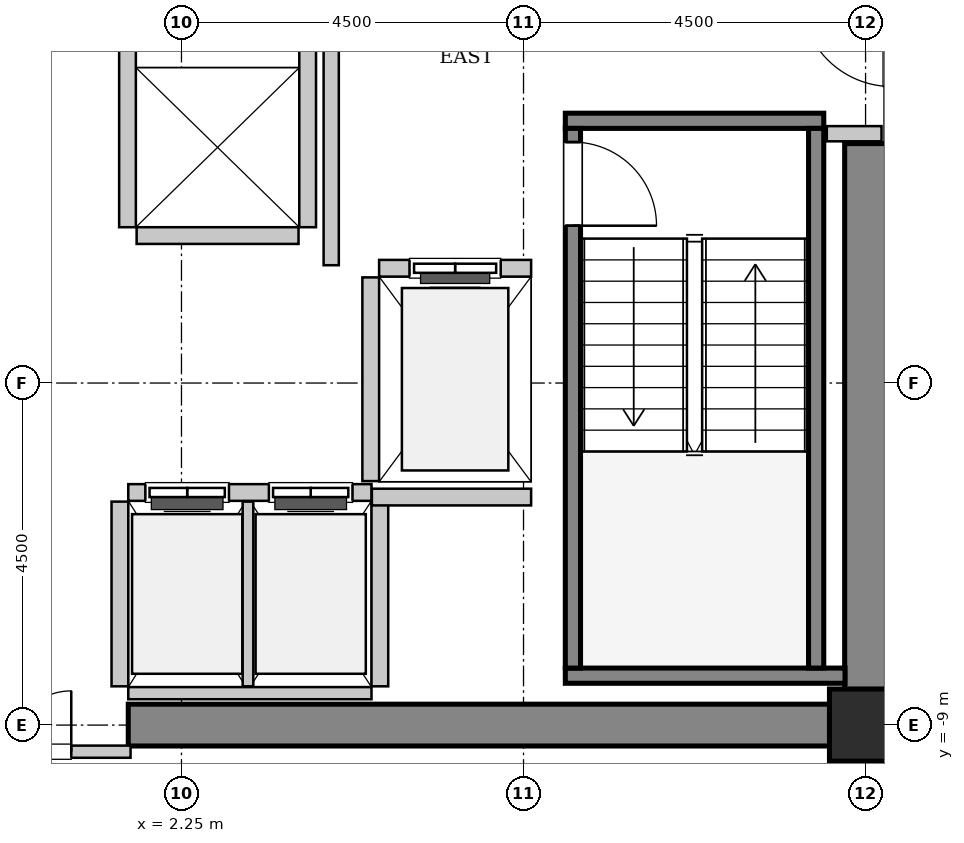
"""IFC4 building model, lengths in metres.
Left out: names, types, materials, properties, quantities, classifications, styles, units other than length and angle.
Written with IfcOpenShell. Run it as: python <this file> out.ifc"""

import sys

from ifc_helpers import new_model, si_unit, direction, frame, frame_2d, origin, origin_2d, place, context, subcontext, project, spatial, rectangle, hollow_rectangle, extrude, source, transform, mapped, element, fill, save


model = new_model("IFC4")
c1 = context("Model", 3, precision=1e-05, world=origin(), true_north=direction((0.0, 1.0)))
c2 = subcontext(c1, "Body", "Model", "MODEL_VIEW")
j1 = project(units=[si_unit("LENGTHUNIT", "METRE"), si_unit("PLANEANGLEUNIT", "RADIAN")], contexts=[c1])
p1 = place(None, origin())
s1 = spatial("IfcSite", under=j1, at=p1, CompositionType="ELEMENT")
p2 = place(p1, origin())
s2 = spatial("IfcBuilding", under=s1, at=p2, CompositionType="ELEMENT")
p3 = place(p2, frame((0.0, 0.0, 183.0)))
s3 = spatial("IfcBuildingStorey", under=s2, at=p3, CompositionType="ELEMENT", Elevation=183.0)
m1 = source(origin(), c2, "Body", "SweptSolid", [
    extrude(rectangle(XDim=9.975, YDim=0.55, at=frame_2d((4.987, 0.0))), origin(), (0.0, 0.0, 1.0), 3.8),
])
p4 = place(p3, frame((1.55, -9.0, 0.0), z_axis=(0.0, 0.0, 1.0), x_axis=(1.0, 0.0, 0.0)))
e1 = element("IfcWall", 1, at=p4, inside=s3, PredefinedType="SHEAR", context=c2, shape_type="MappedRepresentation", body=[
    mapped(m1, transform((0.0, 0.0, 0.0), x_axis=(1.0, 0.0, 0.0), y_axis=(0.0, 1.0, 0.0), z_axis=(0.0, 0.0, 1.0), scale=1.0)),
])
m2 = source(origin(), c2, "Body", "SweptSolid", [
    extrude(rectangle(XDim=7.375, YDim=0.55, at=frame_2d((3.688, 0.0))), origin(), (0.0, 0.0, 1.0), 3.8),
])
p5 = place(p3, frame((11.25, -8.725, 0.0), z_axis=(0.0, 0.0, 1.0), x_axis=(0.0, 1.0, 0.0)))
e2 = element("IfcWall", 2, at=p5, inside=s3, PredefinedType="SHEAR", context=c2, shape_type="MappedRepresentation", body=[
    mapped(m2, transform((0.0, 0.0, 0.0), x_axis=(1.0, 0.0, 0.0), y_axis=(0.0, 1.0, 0.0), z_axis=(0.0, 0.0, 1.0), scale=1.0)),
])
m3 = source(origin(), c2, "Body", "SweptSolid", [
    extrude(hollow_rectangle(XDim=0.95, YDim=0.95, WallThickness=0.045, InnerFilletRadius=0.045, OuterFilletRadius=0.09, at=origin_2d()), origin(), (0.0, 0.0, 1.0), 3.8),
])
p6 = place(p3, frame((11.25, -9.0, 0.0), z_axis=(0.0, 0.0, 1.0), x_axis=(1.0, 0.0, 0.0)))
e3 = element("IfcColumn", 3, at=p6, inside=s3, PredefinedType="COLUMN", context=c2, shape_type="MappedRepresentation", body=[
    mapped(m3, transform((0.0, 0.0, 0.0), x_axis=(1.0, 0.0, 0.0), y_axis=(0.0, 1.0, 0.0), z_axis=(0.0, 0.0, 1.0), scale=1.0)),
])
m4 = source(origin(), c2, "Body", "SweptSolid", [
    extrude(rectangle(XDim=3.4, YDim=0.2, at=frame_2d((1.7, 0.0))), origin(), (0.0, 0.0, 1.0), 3.8),
])
p7 = place(p3, frame((7.3, -1.05, 0.0), z_axis=(0.0, 0.0, 1.0), x_axis=(1.0, 0.0, 0.0)))
e4 = element("IfcWall", 4, at=p7, inside=s3, PredefinedType="SOLIDWALL", context=c2, shape_type="MappedRepresentation", body=[
    mapped(m4, transform((0.0, 0.0, 0.0), x_axis=(1.0, 0.0, 0.0), y_axis=(0.0, 1.0, 0.0), z_axis=(0.0, 0.0, 1.0), scale=1.0)),
])
m5 = source(origin(), c2, "Body", "SweptSolid", [
    extrude(rectangle(XDim=3.68, YDim=0.2, at=frame_2d((1.84, 0.0))), origin(), (0.0, 0.0, 1.0), 3.8),
])
p8 = place(p3, frame((7.3, -8.35, 0.0), z_axis=(0.0, 0.0, 1.0), x_axis=(1.0, 0.0, 0.0)))
e5 = element("IfcWall", 5, at=p8, inside=s3, PredefinedType="SOLIDWALL", context=c2, shape_type="MappedRepresentation", body=[
    mapped(m5, transform((0.0, 0.0, 0.0), x_axis=(1.0, 0.0, 0.0), y_axis=(0.0, 1.0, 0.0), z_axis=(0.0, 0.0, 1.0), scale=1.0)),
])
m6 = source(origin(), c2, "Body", "SweptSolid", [
    extrude(rectangle(XDim=7.1, YDim=0.2, at=frame_2d((3.55, 0.0))), origin(), (0.0, 0.0, 1.0), 3.8),
])
p9 = place(p3, frame((7.4, -1.15, 0.0), z_axis=(0.0, 0.0, 1.0), x_axis=(0.0, -1.0, 0.0)))
e6 = element("IfcWall", 6, at=p9, inside=s3, PredefinedType="SOLIDWALL", context=c2, shape_type="MappedRepresentation", body=[
    mapped(m6, transform((0.0, 0.0, 0.0), x_axis=(1.0, 0.0, 0.0), y_axis=(0.0, 1.0, 0.0), z_axis=(0.0, 0.0, 1.0), scale=1.0)),
])
p10 = place(p9, frame((0.18, 0.0, 0.0)))
e7 = element("IfcOpeningElement", 7, at=p10, cuts=e6, PredefinedType="OPENING", context=c2, shape_type="SweptSolid", body=[
    extrude(rectangle(XDim=1.1, YDim=2.15, at=frame_2d((0.55, 1.075))), frame((0.0, 0.11, 0.0), z_axis=(0.0, -1.0, 0.0), x_axis=(1.0, 0.0, 0.0)), (0.0, 0.0, 1.0), 0.22),
])
p11 = place(p3, frame((10.6, -1.15, 0.0), z_axis=(0.0, 0.0, 1.0), x_axis=(0.0, -1.0, 0.0)))
e8 = element("IfcWall", 8, at=p11, inside=s3, PredefinedType="SOLIDWALL", context=c2, shape_type="MappedRepresentation", body=[
    mapped(m6, transform((0.0, 0.0, 0.0), x_axis=(1.0, 0.0, 0.0), y_axis=(0.0, 1.0, 0.0), z_axis=(0.0, 0.0, 1.0), scale=1.0)),
])
m7 = source(origin(), c2, "Body", "SweptSolid", [
    extrude(rectangle(XDim=2.0, YDim=0.22, at=frame_2d((1.0, 0.0))), origin(), (0.0, 0.0, 1.0), 3.535),
])
p12 = place(p3, frame((6.85, -2.99, 0.0), z_axis=(0.0, 0.0, 1.0), x_axis=(-1.0, 0.0, 0.0)))
e9 = element("IfcWall", 9, at=p12, inside=s3, PredefinedType="SOLIDWALL", context=c2, shape_type="MappedRepresentation", body=[
    mapped(m7, transform((0.0, 0.0, 0.0), x_axis=(1.0, 0.0, 0.0), y_axis=(0.0, 1.0, 0.0), z_axis=(0.0, 0.0, 1.0), scale=1.0)),
])
p13 = place(p12, frame((0.4, 0.0, 0.0)))
e10 = element("IfcOpeningElement", 10, at=p13, cuts=e9, PredefinedType="OPENING", context=c2, shape_type="SweptSolid", body=[
    extrude(rectangle(XDim=1.2, YDim=2.2, at=frame_2d((0.6, 1.1))), frame((0.0, 0.12, 0.0), z_axis=(0.0, -1.0, 0.0), x_axis=(1.0, 0.0, 0.0)), (0.0, 0.0, 1.0), 0.24),
])
m8 = source(origin(), c2, "Body", "SweptSolid", [
    extrude(rectangle(XDim=2.68, YDim=0.22, at=frame_2d((1.34, 0.0))), origin(), (0.0, 0.0, 1.0), 3.535),
])
p14 = place(p3, frame((4.74, -3.11, 0.0), z_axis=(0.0, 0.0, 1.0), x_axis=(0.0, -1.0, 0.0)))
e11 = element("IfcWall", 11, at=p14, inside=s3, PredefinedType="SOLIDWALL", context=c2, shape_type="MappedRepresentation", body=[
    mapped(m8, transform((0.0, 0.0, 0.0), x_axis=(1.0, 0.0, 0.0), y_axis=(0.0, 1.0, 0.0), z_axis=(0.0, 0.0, 1.0), scale=1.0)),
])
m9 = source(origin(), c2, "Body", "SweptSolid", [
    extrude(rectangle(XDim=3.2, YDim=0.22, at=frame_2d((1.6, 0.0))), origin(), (0.0, 0.0, 1.0), 3.535),
])
p15 = place(p3, frame((4.75, -5.94, 0.0), z_axis=(0.0, 0.0, 1.0), x_axis=(-1.0, 0.0, 0.0)))
e12 = element("IfcWall", 12, at=p15, inside=s3, PredefinedType="SOLIDWALL", context=c2, shape_type="MappedRepresentation", body=[
    mapped(m9, transform((0.0, 0.0, 0.0), x_axis=(1.0, 0.0, 0.0), y_axis=(0.0, 1.0, 0.0), z_axis=(0.0, 0.0, 1.0), scale=1.0)),
])
p16 = place(p15, frame((1.875, 0.0, 0.0)))
e13 = element("IfcOpeningElement", 13, at=p16, cuts=e12, PredefinedType="OPENING", context=c2, shape_type="SweptSolid", body=[
    extrude(rectangle(XDim=1.1, YDim=2.2, at=frame_2d((0.55, 1.1))), frame((0.0, 0.12, 0.0), z_axis=(0.0, -1.0, 0.0), x_axis=(1.0, 0.0, 0.0)), (0.0, 0.0, 1.0), 0.24),
])
p17 = place(p15, frame((0.25, 0.0, 0.0)))
e14 = element("IfcOpeningElement", 14, at=p17, cuts=e12, PredefinedType="OPENING", context=c2, shape_type="SweptSolid", body=[
    extrude(rectangle(XDim=1.1, YDim=2.2, at=frame_2d((0.55, 1.1))), frame((0.0, 0.12, 0.0), z_axis=(0.0, -1.0, 0.0), x_axis=(1.0, 0.0, 0.0)), (0.0, 0.0, 1.0), 0.24),
])
m10 = source(origin(), c2, "Body", "SweptSolid", [
    extrude(rectangle(XDim=3.2, YDim=0.16, at=frame_2d((1.6, 0.0))), origin(), (0.0, 0.0, 1.0), 2.425),
])
p18 = place(p3, frame((1.55, -8.58, 0.0), z_axis=(0.0, 0.0, 1.0), x_axis=(1.0, 0.0, 0.0)))
e15 = element("IfcWall", 15, at=p18, inside=s3, PredefinedType="PARTITIONING", context=c2, shape_type="MappedRepresentation", body=[
    mapped(m10, transform((0.0, 0.0, 0.0), x_axis=(1.0, 0.0, 0.0), y_axis=(0.0, 1.0, 0.0), z_axis=(0.0, 0.0, 1.0), scale=1.0)),
])
m11 = source(origin(), c2, "Body", "SweptSolid", [
    extrude(rectangle(XDim=2.43, YDim=0.22, at=frame_2d((1.215, 0.0))), origin(), (0.0, 0.0, 1.0), 3.535),
])
p19 = place(p3, frame((1.44, -6.06, 0.0), z_axis=(0.0, 0.0, 1.0), x_axis=(0.0, -1.0, 0.0)))
e16 = element("IfcWall", 16, at=p19, inside=s3, PredefinedType="SOLIDWALL", context=c2, shape_type="MappedRepresentation", body=[
    mapped(m11, transform((0.0, 0.0, 0.0), x_axis=(1.0, 0.0, 0.0), y_axis=(0.0, 1.0, 0.0), z_axis=(0.0, 0.0, 1.0), scale=1.0)),
])
m12 = source(origin(), c2, "Body", "SweptSolid", [
    extrude(rectangle(XDim=2.43, YDim=0.14, at=frame_2d((1.215, 0.0))), origin(), (0.0, 0.0, 1.0), 3.535),
])
p20 = place(p3, frame((3.125, -8.49, 0.0), z_axis=(0.0, 0.0, 1.0), x_axis=(0.0, 1.0, 0.0)))
e17 = element("IfcWall", 17, at=p20, inside=s3, PredefinedType="PARTITIONING", context=c2, shape_type="MappedRepresentation", body=[
    mapped(m12, transform((0.0, 0.0, 0.0), x_axis=(1.0, 0.0, 0.0), y_axis=(0.0, 1.0, 0.0), z_axis=(0.0, 0.0, 1.0), scale=1.0)),
])
p21 = place(p3, frame((4.86, -8.49, 0.0), z_axis=(0.0, 0.0, 1.0), x_axis=(0.0, 1.0, 0.0)))
e18 = element("IfcWall", 18, at=p21, inside=s3, PredefinedType="SOLIDWALL", context=c2, shape_type="MappedRepresentation", body=[
    mapped(m11, transform((0.0, 0.0, 0.0), x_axis=(1.0, 0.0, 0.0), y_axis=(0.0, 1.0, 0.0), z_axis=(0.0, 0.0, 1.0), scale=1.0)),
])
m13 = source(origin(), c2, "Body", "SweptSolid", [
    extrude(rectangle(XDim=4.9, YDim=0.22, at=frame_2d((2.45, 0.0))), origin(), (0.0, 0.0, 1.0), 3.535),
])
for number, where, z_axis, x_axis in (
    (19, (1.54, 2.45, 0.0), (0.0, 0.0, 1.0), (0.0, -1.0, 0.0)),
    (20, (3.91, -2.45, 0.0), (0.0, 0.0, 1.0), (0.0, 1.0, 0.0)),
):
    element("IfcWall", number, at=place(p3, frame(where, z_axis=z_axis, x_axis=x_axis)), inside=s3, PredefinedType="SOLIDWALL", context=c2, shape_type="MappedRepresentation", body=[
        mapped(m13, transform((0.0, 0.0, 0.0), x_axis=(1.0, 0.0, 0.0), y_axis=(0.0, 1.0, 0.0), z_axis=(0.0, 0.0, 1.0), scale=1.0)),
    ])
m14 = source(origin(), c2, "Body", "SweptSolid", [
    extrude(rectangle(XDim=2.13, YDim=0.22, at=frame_2d((1.065, 0.0))), origin(), (0.0, 0.0, 1.0), 3.535),
])
p22 = place(p3, frame((1.66, -2.56, 0.0), z_axis=(0.0, 0.0, 1.0), x_axis=(1.0, 0.0, 0.0)))
e21 = element("IfcWall", 21, at=p22, inside=s3, PredefinedType="SOLIDWALL", context=c2, shape_type="MappedRepresentation", body=[
    mapped(m14, transform((0.0, 0.0, 0.0), x_axis=(1.0, 0.0, 0.0), y_axis=(0.0, 1.0, 0.0), z_axis=(0.0, 0.0, 1.0), scale=1.0)),
])
m15 = source(origin(), c2, "Body", "SweptSolid", [
    extrude(rectangle(XDim=2.095, YDim=0.22, at=frame_2d((1.048, 0.0))), origin(), (0.0, 0.0, 1.0), 3.535),
])
p23 = place(p3, frame((4.755, -6.0, 0.0), z_axis=(0.0, 0.0, 1.0), x_axis=(1.0, 0.0, 0.0)))
e22 = element("IfcWall", 22, at=p23, inside=s3, PredefinedType="SOLIDWALL", context=c2, shape_type="MappedRepresentation", body=[
    mapped(m15, transform((0.0, 0.0, 0.0), x_axis=(1.0, 0.0, 0.0), y_axis=(0.0, 1.0, 0.0), z_axis=(0.0, 0.0, 1.0), scale=1.0)),
])
m16 = source(origin(), c2, "Body", "SweptSolid", [
    extrude(rectangle(XDim=5.9, YDim=0.2, at=frame_2d((2.95, 0.0))), origin(), (0.0, 0.0, 1.0), 3.535),
])
p24 = place(p3, frame((4.22, -2.95, 0.0), z_axis=(0.0, 0.0, 1.0), x_axis=(0.0, 1.0, 0.0)))
e23 = element("IfcWall", 23, at=p24, inside=s3, PredefinedType="PARTITIONING", context=c2, shape_type="MappedRepresentation", body=[
    mapped(m16, transform((0.0, 0.0, 0.0), x_axis=(1.0, 0.0, 0.0), y_axis=(0.0, 1.0, 0.0), z_axis=(0.0, 0.0, 1.0), scale=1.0)),
])
m17 = source(origin(), c2, "Body", "SweptSolid", [
    extrude(rectangle(XDim=0.72, YDim=0.2, at=frame_2d((0.36, 0.0))), origin(), (0.0, 0.0, 1.0), 3.535),
])
p25 = place(p3, frame((10.74, -1.22, 0.0), z_axis=(0.0, 0.0, 1.0), x_axis=(1.0, 0.0, 0.0)))
e24 = element("IfcWall", 24, at=p25, inside=s3, PredefinedType="PARTITIONING", context=c2, shape_type="MappedRepresentation", body=[
    mapped(m17, transform((0.0, 0.0, 0.0), x_axis=(1.0, 0.0, 0.0), y_axis=(0.0, 1.0, 0.0), z_axis=(0.0, 0.0, 1.0), scale=1.0)),
])
m18 = source(origin(), c2, "Body", "SweptSolid", [
    extrude(rectangle(XDim=3.16, YDim=0.16, at=frame_2d((1.58, 0.0))), origin(), (0.0, 0.0, 1.0), 2.425),
])
p26 = place(p3, frame((-1.58, -9.35, 0.0), z_axis=(0.0, 0.0, 1.0), x_axis=(1.0, 0.0, 0.0)))
e25 = element("IfcWall", 25, at=p26, inside=s3, PredefinedType="PARTITIONING", context=c2, shape_type="MappedRepresentation", body=[
    mapped(m18, transform((0.0, 0.0, 0.0), x_axis=(1.0, 0.0, 0.0), y_axis=(0.0, 1.0, 0.0), z_axis=(0.0, 0.0, 1.0), scale=1.0)),
])
p27 = place(p26, frame((0.78, 0.0, 0.0)))
e26 = element("IfcOpeningElement", 26, at=p27, cuts=e25, PredefinedType="OPENING", context=c2, shape_type="SweptSolid", body=[
    extrude(rectangle(XDim=1.6, YDim=2.3, at=frame_2d((0.8, 1.15))), frame((0.0, 0.09, 0.0), z_axis=(0.0, -1.0, 0.0), x_axis=(1.0, 0.0, 0.0)), (0.0, 0.0, 1.0), 0.18),
])
m19 = source(origin(), c2, "Body", "SweptSolid", [
    extrude(rectangle(XDim=1.1, YDim=2.15, at=frame_2d((0.55, 1.075))), frame((0.0, 0.025, 0.0), z_axis=(0.0, -1.0, 0.0), x_axis=(1.0, 0.0, 0.0)), (0.0, 0.0, 1.0), 0.05),
])
p28 = place(p10, origin())
e27 = element("IfcDoor", 27, at=p28, inside=s3, OperationType="SINGLE_SWING_RIGHT", PredefinedType="DOOR", context=c2, shape_type="MappedRepresentation", body=[
    mapped(m19, transform((0.0, 0.0, 0.0), x_axis=(1.0, 0.0, 0.0), y_axis=(0.0, 1.0, 0.0), z_axis=(0.0, 0.0, 1.0), scale=1.0)),
])
fill(e7, e27)
m20 = source(origin(), c2, "Body", "SweptSolid", [
    extrude(rectangle(XDim=1.2, YDim=2.2, at=frame_2d((0.6, 1.1))), frame((0.0, 0.025, 0.0), z_axis=(0.0, -1.0, 0.0), x_axis=(1.0, 0.0, 0.0)), (0.0, 0.0, 1.0), 0.05),
])
p29 = place(p13, origin())
e28 = element("IfcDoor", 28, at=p29, inside=s3, OperationType="SLIDING_TO_LEFT", PredefinedType="DOOR", context=c2, shape_type="MappedRepresentation", body=[
    mapped(m20, transform((0.0, 0.0, 0.0), x_axis=(1.0, 0.0, 0.0), y_axis=(0.0, 1.0, 0.0), z_axis=(0.0, 0.0, 1.0), scale=1.0)),
])
fill(e10, e28)
m21 = source(origin(), c2, "Body", "SweptSolid", [
    extrude(rectangle(XDim=1.1, YDim=2.2, at=frame_2d((0.55, 1.1))), frame((0.0, 0.025, 0.0), z_axis=(0.0, -1.0, 0.0), x_axis=(1.0, 0.0, 0.0)), (0.0, 0.0, 1.0), 0.05),
])
p30 = place(p16, origin())
e29 = element("IfcDoor", 29, at=p30, inside=s3, OperationType="DOUBLE_DOOR_SLIDING", PredefinedType="DOOR", context=c2, shape_type="MappedRepresentation", body=[
    mapped(m21, transform((0.0, 0.0, 0.0), x_axis=(1.0, 0.0, 0.0), y_axis=(0.0, 1.0, 0.0), z_axis=(0.0, 0.0, 1.0), scale=1.0)),
])
fill(e13, e29)
p31 = place(p17, origin())
e30 = element("IfcDoor", 30, at=p31, inside=s3, OperationType="DOUBLE_DOOR_SLIDING", PredefinedType="DOOR", context=c2, shape_type="MappedRepresentation", body=[
    mapped(m21, transform((0.0, 0.0, 0.0), x_axis=(1.0, 0.0, 0.0), y_axis=(0.0, 1.0, 0.0), z_axis=(0.0, 0.0, 1.0), scale=1.0)),
])
fill(e14, e30)
m22 = source(origin(), c2, "Body", "SweptSolid", [
    extrude(rectangle(XDim=1.6, YDim=2.3, at=frame_2d((0.8, 1.15))), frame((0.0, 0.025, 0.0), z_axis=(0.0, -1.0, 0.0), x_axis=(1.0, 0.0, 0.0)), (0.0, 0.0, 1.0), 0.05),
])
p32 = place(p27, origin())
e31 = element("IfcDoor", 31, at=p32, inside=s3, OperationType="DOUBLE_DOOR_SINGLE_SWING", PredefinedType="DOOR", context=c2, shape_type="MappedRepresentation", body=[
    mapped(m22, transform((0.0, 0.0, 0.0), x_axis=(1.0, 0.0, 0.0), y_axis=(0.0, 1.0, 0.0), z_axis=(0.0, 0.0, 1.0), scale=1.0)),
])
fill(e26, e31)
save(model, sys.argv[1])
